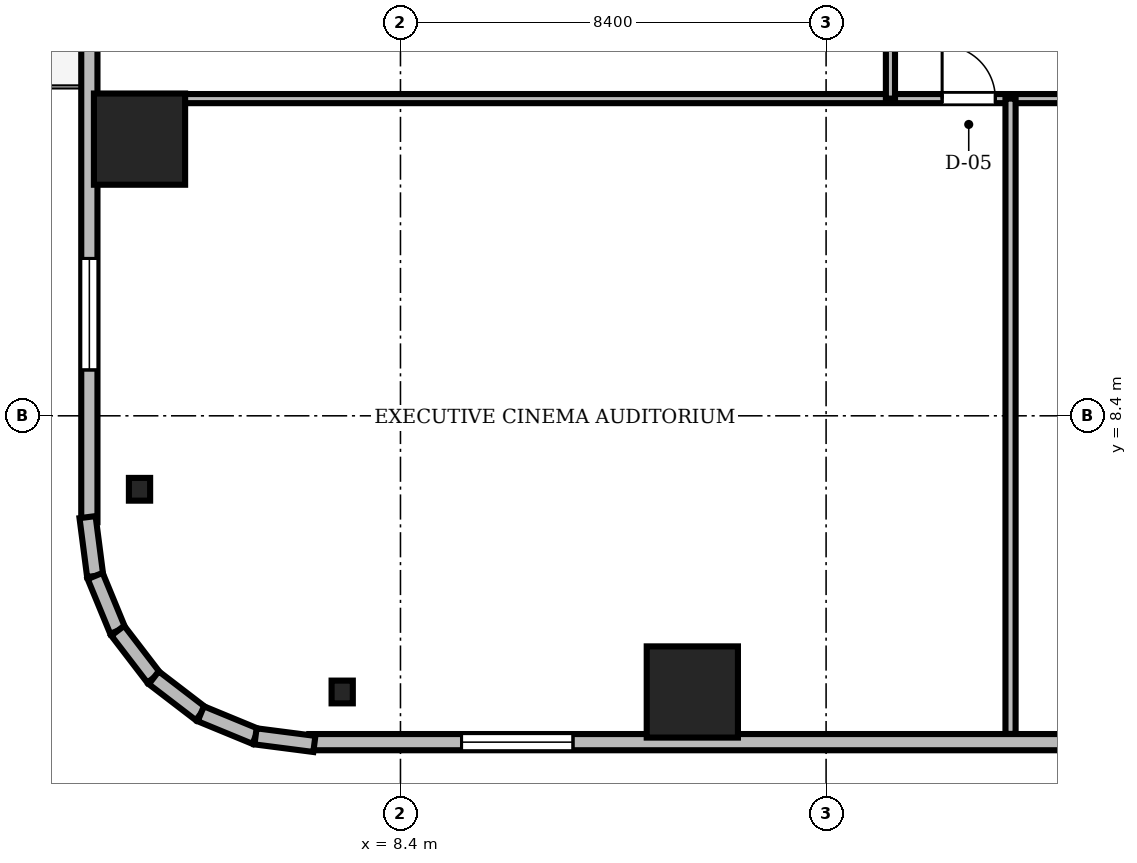
"""IFC4 building model, lengths in metres.
Left out: names, types, materials, properties, quantities, classifications, styles, units other than length and angle.
Written with IfcOpenShell. Run it as: python <this file> out.ifc"""

import sys

from ifc_helpers import new_model, si_unit, direction, frame, frame_2d, origin, origin_2d, place, context, subcontext, project, spatial, rectangle, i_section, extrude, source, transform, mapped, element, fill, save


model = new_model("IFC4")
c1 = context("Model", 3, precision=1e-05, world=origin(), true_north=direction((0.0, 1.0)))
c2 = subcontext(c1, "Body", "Model", "MODEL_VIEW")
j1 = project(units=[si_unit("LENGTHUNIT", "METRE"), si_unit("PLANEANGLEUNIT", "RADIAN")], contexts=[c1])
p1 = place(None, origin())
s1 = spatial("IfcSite", under=j1, at=p1, CompositionType="ELEMENT")
p2 = place(p1, origin())
s2 = spatial("IfcBuilding", under=s1, at=p2, CompositionType="ELEMENT")
p3 = place(p2, frame((0.0, 0.0, 89.65)))
s3 = spatial("IfcBuildingStorey", under=s2, at=p3, CompositionType="ELEMENT", Elevation=89.65)
m1 = source(origin(), c2, "Body", "SweptSolid", [
    extrude(rectangle(XDim=1.8, YDim=1.8, at=origin_2d()), origin(), (0.0, 0.0, 1.0), 3.0),
])
for number, where, z_axis, x_axis in (
    (1, (14.16, 2.95, 0.0), (0.0, 0.0, 1.0), (1.0, 0.0, 0.0)),
    (2, (3.25, 13.86, 0.0), (0.0, 0.0, 1.0), (1.0, 0.0, 0.0)),
):
    element("IfcColumn", number, at=place(p3, frame(where, z_axis=z_axis, x_axis=x_axis)), inside=s3, PredefinedType="COLUMN", context=c2, shape_type="MappedRepresentation", body=[
        mapped(m1, transform((0.0, 0.0, 0.0), scale=1.0)),
    ])
m2 = source(origin(), c2, "Body", "SweptSolid", [
    extrude(i_section(OverallWidth=0.419, OverallDepth=0.449, WebThickness=0.031, FlangeThickness=0.048, FilletRadius=0.015, at=origin_2d()), origin(), (0.0, 0.0, 1.0), 3.0),
])
for number, where, z_axis, x_axis in (
    (3, (7.25, 2.95, 0.0), (0.0, 0.0, 1.0), (1.0, 0.0, 0.0)),
    (4, (3.25, 6.95, 0.0), (0.0, 0.0, 1.0), (1.0, 0.0, 0.0)),
):
    element("IfcColumn", number, at=place(p3, frame(where, z_axis=z_axis, x_axis=x_axis)), inside=s3, PredefinedType="COLUMN", context=c2, shape_type="MappedRepresentation", body=[
        mapped(m2, transform((0.0, 0.0, 0.0), scale=1.0)),
    ])
m3 = source(origin(), c2, "Body", "SweptSolid", [
    extrude(rectangle(XDim=15.6, YDim=0.32, at=frame_2d((7.8, 0.0))), origin(), (0.0, 0.0, 1.0), 3.0),
])
p4 = place(p3, frame((6.6, 1.96, 0.0), z_axis=(0.0, 0.0, 1.0), x_axis=(1.0, 0.0, 0.0)))
e5 = element("IfcWall", 5, at=p4, inside=s3, PredefinedType="SOLIDWALL", context=c2, shape_type="MappedRepresentation", body=[
    mapped(m3, transform((0.0, 0.0, 0.0), scale=1.0)),
])
m4 = source(origin(), c2, "Body", "SweptSolid", [
    extrude(rectangle(XDim=2.2, YDim=2.4, at=frame_2d((1.1, 1.2))), frame((0.0, 0.17, 0.0), z_axis=(0.0, -1.0, 0.0), x_axis=(1.0, 0.0, 0.0)), (0.0, 0.0, 1.0), 0.34),
])
p5 = place(p4, frame((3.005, 0.0, 0.35)))
e6 = element("IfcOpeningElement", 6, at=p5, cuts=e5, PredefinedType="OPENING", context=c2, shape_type="MappedRepresentation", body=[
    mapped(m4, transform((0.0, 0.0, 0.0), scale=1.0)),
])
p6 = place(p3, frame((2.26, 21.9, 0.0), z_axis=(0.0, 0.0, 1.0), x_axis=(0.0, -1.0, 0.0)))
e7 = element("IfcWall", 7, at=p6, inside=s3, PredefinedType="SOLIDWALL", context=c2, shape_type="MappedRepresentation", body=[
    mapped(m3, transform((0.0, 0.0, 0.0), scale=1.0)),
])
m5 = source(origin(), c2, "Body", "SweptSolid", [
    extrude(rectangle(XDim=1.4, YDim=2.3, at=frame_2d((0.7, 1.15))), frame((0.0, 0.17, 0.0), z_axis=(0.0, -1.0, 0.0), x_axis=(1.0, 0.0, 0.0)), (0.0, 0.0, 1.0), 0.34),
])
p7 = place(p6, frame((4.59, 0.0, 0.0)))
e8 = element("IfcOpeningElement", 8, at=p7, cuts=e7, PredefinedType="OPENING", context=c2, shape_type="MappedRepresentation", body=[
    mapped(m5, transform((0.0, 0.0, 0.0), scale=1.0)),
])
p8 = place(p6, frame((10.395, 0.0, 0.35)))
e9 = element("IfcOpeningElement", 9, at=p8, cuts=e7, PredefinedType="OPENING", context=c2, shape_type="MappedRepresentation", body=[
    mapped(m4, transform((0.0, 0.0, 0.0), scale=1.0)),
])
m6 = source(origin(), c2, "Body", "SweptSolid", [
    extrude(rectangle(XDim=1.171, YDim=0.32, at=frame_2d((0.585, 0.0))), origin(), (0.0, 0.0, 1.0), 3.0),
])
p9 = place(p3, frame((2.224, 6.401, 0.0), z_axis=(0.0, 0.0, 1.0), x_axis=(0.128269133229, -0.991739395941, 0.0)))
e10 = element("IfcWall", 10, at=p9, inside=s3, PredefinedType="SOLIDWALL", context=c2, shape_type="MappedRepresentation", body=[
    mapped(m6, transform((0.0, 0.0, 0.0), scale=1.0)),
])
m7 = source(origin(), c2, "Body", "SweptSolid", [
    extrude(rectangle(XDim=1.169, YDim=0.32, at=frame_2d((0.584, 0.0))), origin(), (0.0, 0.0, 1.0), 3.0),
])
for number, where, z_axis, x_axis in (
    (11, (2.375, 5.24, 0.0), (0.0, 0.0, 1.0), (0.381, -0.925, 0.0)),
    (12, (2.82, 4.159, 0.0), (0.0, 0.0, 1.0), (0.608, -0.794, 0.0)),
):
    element("IfcWall", number, at=place(p3, frame(where, z_axis=z_axis, x_axis=x_axis)), inside=s3, PredefinedType="SOLIDWALL", context=c2, shape_type="MappedRepresentation", body=[
        mapped(m7, transform((0.0, 0.0, 0.0), scale=1.0)),
    ])
m8 = source(origin(), c2, "Body", "SweptSolid", [
    extrude(rectangle(XDim=1.169, YDim=0.32, at=frame_2d((0.584, 0.0))), origin(), (0.0, 0.0, 1.0), 3.0),
])
p10 = place(p3, frame((3.531, 3.231, 0.0), z_axis=(0.0, 0.0, 1.0), x_axis=(0.793663520347, -0.608356981114, 0.0)))
e13 = element("IfcWall", 13, at=p10, inside=s3, PredefinedType="SOLIDWALL", context=c2, shape_type="MappedRepresentation", body=[
    mapped(m8, transform((0.0, 0.0, 0.0), scale=1.0)),
])
m9 = source(origin(), c2, "Body", "SweptSolid", [
    extrude(rectangle(XDim=1.169, YDim=0.32, at=frame_2d((0.585, 0.0))), origin(), (0.0, 0.0, 1.0), 3.0),
])
p11 = place(p3, frame((4.459, 2.52, 0.0), z_axis=(0.0, 0.0, 1.0), x_axis=(0.924479075121, -0.381232789334, 0.0)))
e14 = element("IfcWall", 14, at=p11, inside=s3, PredefinedType="SOLIDWALL", context=c2, shape_type="MappedRepresentation", body=[
    mapped(m9, transform((0.0, 0.0, 0.0), scale=1.0)),
])
m10 = source(origin(), c2, "Body", "SweptSolid", [
    extrude(rectangle(XDim=1.17, YDim=0.32, at=frame_2d((0.585, 0.0))), origin(), (0.0, 0.0, 1.0), 3.0),
])
p12 = place(p3, frame((5.54, 2.074, 0.0), z_axis=(0.0, 0.0, 1.0), x_axis=(0.991762485493, -0.128090485085, 0.0)))
e15 = element("IfcWall", 15, at=p12, inside=s3, PredefinedType="SOLIDWALL", context=c2, shape_type="MappedRepresentation", body=[
    mapped(m10, transform((0.0, 0.0, 0.0), scale=1.0)),
])
m11 = source(origin(), c2, "Body", "SweptSolid", [
    extrude(rectangle(XDim=46.156, YDim=0.18, at=frame_2d((23.078, 0.0))), origin(), (0.0, 0.0, 1.0), 2.276),
])
p13 = place(p3, frame((2.422, 14.66, 0.0), z_axis=(0.0, 0.0, 1.0), x_axis=(1.0, 0.0, 0.0)))
e16 = element("IfcWall", 16, at=p13, inside=s3, PredefinedType="PARTITIONING", context=c2, shape_type="MappedRepresentation", body=[
    mapped(m11, transform((0.0, 0.0, 0.0), scale=1.0)),
])
m12 = source(origin(), c2, "Body", "SweptSolid", [
    extrude(rectangle(XDim=1.05, YDim=2.2, at=frame_2d((0.525, 1.1))), frame((0.0, 0.1, 0.0), z_axis=(0.0, -1.0, 0.0), x_axis=(1.0, 0.0, 0.0)), (0.0, 0.0, 1.0), 0.2),
])
p14 = place(p13, frame((16.668, 0.0, 0.0)))
e17 = element("IfcOpeningElement", 17, at=p14, cuts=e16, PredefinedType="OPENING", context=c2, shape_type="MappedRepresentation", body=[
    mapped(m12, transform((0.0, 0.0, 0.0), scale=1.0)),
])
p15 = place(p13, frame((19.36, 0.0, 0.0)))
e18 = element("IfcOpeningElement", 18, at=p15, cuts=e16, PredefinedType="OPENING", context=c2, shape_type="MappedRepresentation", body=[
    mapped(m12, transform((0.0, 0.0, 0.0), scale=1.0)),
])
p16 = place(p13, frame((23.085, 0.0, 0.0)))
e19 = element("IfcOpeningElement", 19, at=p16, cuts=e16, PredefinedType="OPENING", context=c2, shape_type="MappedRepresentation", body=[
    mapped(m12, transform((0.0, 0.0, 0.0), scale=1.0)),
])
p17 = place(p13, frame((26.809, 0.0, 0.0)))
e20 = element("IfcOpeningElement", 20, at=p17, cuts=e16, PredefinedType="OPENING", context=c2, shape_type="MappedRepresentation", body=[
    mapped(m12, transform((0.0, 0.0, 0.0), scale=1.0)),
])
p18 = place(p13, frame((30.534, 0.0, 0.0)))
e21 = element("IfcOpeningElement", 21, at=p18, cuts=e16, PredefinedType="OPENING", context=c2, shape_type="MappedRepresentation", body=[
    mapped(m12, transform((0.0, 0.0, 0.0), scale=1.0)),
])
p19 = place(p13, frame((34.259, 0.0, 0.0)))
e22 = element("IfcOpeningElement", 22, at=p19, cuts=e16, PredefinedType="OPENING", context=c2, shape_type="MappedRepresentation", body=[
    mapped(m12, transform((0.0, 0.0, 0.0), scale=1.0)),
])
p20 = place(p13, frame((37.983, 0.0, 0.0)))
e23 = element("IfcOpeningElement", 23, at=p20, cuts=e16, PredefinedType="OPENING", context=c2, shape_type="MappedRepresentation", body=[
    mapped(m12, transform((0.0, 0.0, 0.0), scale=1.0)),
])
p21 = place(p13, frame((42.727, 0.0, 0.0)))
e24 = element("IfcOpeningElement", 24, at=p21, cuts=e16, PredefinedType="OPENING", context=c2, shape_type="MappedRepresentation", body=[
    mapped(m12, transform((0.0, 0.0, 0.0), scale=1.0)),
])
m13 = source(origin(), c2, "Body", "SweptSolid", [
    extrude(rectangle(XDim=13.89, YDim=0.18, at=frame_2d((6.945, 0.0))), origin(), (0.0, 0.0, 1.0), 2.442),
])
p22 = place(p3, frame((18.07, 14.66, 0.0), z_axis=(0.0, 0.0, 1.0), x_axis=(0.0, 1.0, 0.0)))
e25 = element("IfcWall", 25, at=p22, inside=s3, PredefinedType="PARTITIONING", context=c2, shape_type="MappedRepresentation", body=[
    mapped(m13, transform((0.0, 0.0, 0.0), scale=1.0)),
])
p23 = place(p22, frame((1.77, 0.0, 0.0)))
e26 = element("IfcOpeningElement", 26, at=p23, cuts=e25, PredefinedType="OPENING", context=c2, shape_type="MappedRepresentation", body=[
    mapped(m12, transform((0.0, 0.0, 0.0), scale=1.0)),
])
m14 = source(origin(), c2, "Body", "SweptSolid", [
    extrude(rectangle(XDim=0.95, YDim=2.15, at=frame_2d((0.475, 1.075))), frame((0.0, 0.1, 0.0), z_axis=(0.0, -1.0, 0.0), x_axis=(1.0, 0.0, 0.0)), (0.0, 0.0, 1.0), 0.2),
])
p24 = place(p22, frame((7.575, 0.0, 0.0)))
e27 = element("IfcOpeningElement", 27, at=p24, cuts=e25, PredefinedType="OPENING", context=c2, shape_type="MappedRepresentation", body=[
    mapped(m14, transform((0.0, 0.0, 0.0), scale=1.0)),
])
p25 = place(p22, frame((10.93, 0.0, 0.0)))
e28 = element("IfcOpeningElement", 28, at=p25, cuts=e25, PredefinedType="OPENING", context=c2, shape_type="MappedRepresentation", body=[
    mapped(m12, transform((0.0, 0.0, 0.0), scale=1.0)),
])
m15 = source(origin(), c2, "Body", "SweptSolid", [
    extrude(rectangle(XDim=12.538, YDim=0.2, at=frame_2d((6.269, 0.0))), origin(), (0.0, 0.0, 1.0), 2.276),
])
p26 = place(p3, frame((20.44, 2.122, 0.0), z_axis=(0.0, 0.0, 1.0), x_axis=(0.0, 1.0, 0.0)))
e29 = element("IfcWall", 29, at=p26, inside=s3, PredefinedType="PARTITIONING", context=c2, shape_type="MappedRepresentation", body=[
    mapped(m15, transform((0.0, 0.0, 0.0), scale=1.0)),
])
m16 = source(origin(), c2, "Body", "SweptSolid", [
    extrude(rectangle(XDim=2.2, YDim=2.4, at=frame_2d((1.1, 1.2))), frame((0.0, 0.03, 0.0), z_axis=(0.0, -1.0, 0.0), x_axis=(1.0, 0.0, 0.0)), (0.0, 0.0, 1.0), 0.06),
])
p27 = place(p5, origin())
e30 = element("IfcWindow", 30, at=p27, inside=s3, PartitioningType="SINGLE_PANEL", PredefinedType="WINDOW", context=c2, shape_type="MappedRepresentation", body=[
    mapped(m16, transform((0.0, 0.0, 0.0), scale=1.0)),
])
fill(e6, e30)
p28 = place(p8, origin())
e31 = element("IfcWindow", 31, at=p28, inside=s3, PartitioningType="SINGLE_PANEL", PredefinedType="WINDOW", context=c2, shape_type="MappedRepresentation", body=[
    mapped(m16, transform((0.0, 0.0, 0.0), scale=1.0)),
])
fill(e9, e31)
m17 = source(origin(), c2, "Body", "SweptSolid", [
    extrude(rectangle(XDim=1.05, YDim=2.2, at=frame_2d((0.525, 1.1))), frame((0.0, 0.025, 0.0), z_axis=(0.0, -1.0, 0.0), x_axis=(1.0, 0.0, 0.0)), (0.0, 0.0, 1.0), 0.05),
])
p29 = place(p14, origin())
e32 = element("IfcDoor", 32, at=p29, inside=s3, OperationType="SINGLE_SWING_LEFT", PredefinedType="DOOR", context=c2, shape_type="MappedRepresentation", body=[
    mapped(m17, transform((0.0, 0.0, 0.0), scale=1.0)),
])
fill(e17, e32)
save(model, sys.argv[1])
